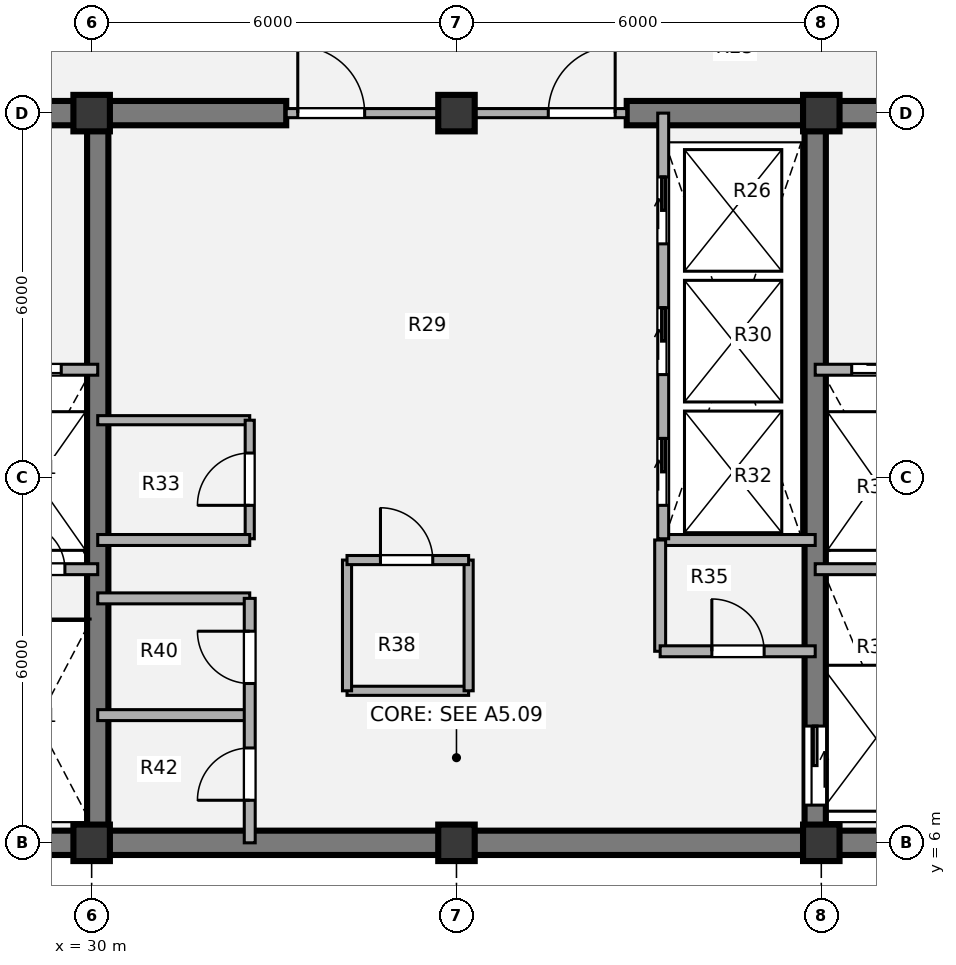
"""IFC4 building model, lengths in metres.
Left out: names, types, materials, properties, quantities, classifications, styles, units other than length and angle.
Written with IfcOpenShell. Run it as: python <this file> out.ifc"""

import sys

from ifc_helpers import new_model, si_unit, direction, frame, frame_2d, origin, origin_2d, place, context, subcontext, project, spatial, rectangle, extrude, source, transform, mapped, element, fill, save


model = new_model("IFC4")
c1 = context("Model", 3, precision=1e-05, world=origin(), true_north=direction((0.0, 1.0)))
c2 = subcontext(c1, "Body", "Model", "MODEL_VIEW")
j1 = project(units=[si_unit("LENGTHUNIT", "METRE"), si_unit("PLANEANGLEUNIT", "RADIAN")], contexts=[c1])
p1 = place(None, origin())
s1 = spatial("IfcSite", under=j1, at=p1, CompositionType="ELEMENT")
p2 = place(p1, origin())
s2 = spatial("IfcBuilding", under=s1, at=p2, CompositionType="ELEMENT")
p3 = place(p2, frame((0.0, 0.0, 223.02)))
s3 = spatial("IfcBuildingStorey", under=s2, at=p3, CompositionType="ELEMENT", Elevation=223.02)
m1 = source(origin(), c2, "Body", "SweptSolid", [
    extrude(rectangle(XDim=0.6, YDim=0.6, at=origin_2d()), origin(), (0.0, 0.0, 1.0), 3.78),
])
for number, where, z_axis, x_axis in (
    (1, (30.0, 6.0, 0.0), (0.0, 0.0, 1.0), (1.0, 0.0, 0.0)),
    (2, (36.0, 6.0, 0.0), (0.0, 0.0, 1.0), (1.0, 0.0, 0.0)),
    (3, (42.0, 6.0, 0.0), (0.0, 0.0, 1.0), (1.0, 0.0, 0.0)),
    (4, (30.0, 18.0, 0.0), (0.0, 0.0, 1.0), (1.0, 0.0, 0.0)),
    (5, (36.0, 18.0, 0.0), (0.0, 0.0, 1.0), (1.0, 0.0, 0.0)),
    (6, (42.0, 18.0, 0.0), (0.0, 0.0, 1.0), (1.0, 0.0, 0.0)),
):
    element("IfcColumn", number, at=place(p3, frame(where, z_axis=z_axis, x_axis=x_axis)), inside=s3, PredefinedType="COLUMN", context=c2, shape_type="MappedRepresentation", body=[
        mapped(m1, transform((0.0, 0.0, 0.0), x_axis=(1.0, 0.0, 0.0), y_axis=(0.0, 1.0, 0.0), z_axis=(0.0, 0.0, 1.0), scale=1.0)),
    ])
p4 = place(p3, frame((48.2, 6.0, 0.0), z_axis=(0.0, 0.0, 1.0), x_axis=(-1.0, 0.0, 0.0)))
e7 = element("IfcWall", 7, at=p4, inside=s3, PredefinedType="SHEAR", context=c2, shape_type="SweptSolid", body=[
    extrude(rectangle(XDim=24.4, YDim=0.4, at=frame_2d((12.2, 0.0))), origin(), (0.0, 0.0, 1.0), 3.78),
])
p5 = place(p3, frame((23.8, 18.0, 0.0), z_axis=(0.0, 0.0, 1.0), x_axis=(1.0, 0.0, 0.0)))
e8 = element("IfcWall", 8, at=p5, inside=s3, PredefinedType="SHEAR", context=c2, shape_type="SweptSolid", body=[
    extrude(rectangle(XDim=9.4, YDim=0.4, at=frame_2d((4.7, 0.0))), origin(), (0.0, 0.0, 1.0), 3.78),
])
p6 = place(p5, frame((2.95, 0.0, 0.0)))
e9 = element("IfcOpeningElement", 9, at=p6, cuts=e8, PredefinedType="OPENING", context=c2, shape_type="SweptSolid", body=[
    extrude(rectangle(XDim=1.1, YDim=2.1, at=origin_2d()), frame((0.55, 0.21, 1.05), z_axis=(0.0, -1.0, 0.0), x_axis=(1.0, 0.0, 0.0)), (0.0, 0.0, 1.0), 0.42),
])
p7 = place(p3, frame((38.8, 18.0, 0.0), z_axis=(0.0, 0.0, 1.0), x_axis=(1.0, 0.0, 0.0)))
e10 = element("IfcWall", 10, at=p7, inside=s3, PredefinedType="SHEAR", context=c2, shape_type="SweptSolid", body=[
    extrude(rectangle(XDim=9.4, YDim=0.4, at=frame_2d((4.7, 0.0))), origin(), (0.0, 0.0, 1.0), 3.78),
])
p8 = place(p7, frame((5.45, 0.0, 0.0)))
e11 = element("IfcOpeningElement", 11, at=p8, cuts=e10, PredefinedType="OPENING", context=c2, shape_type="SweptSolid", body=[
    extrude(rectangle(XDim=1.1, YDim=2.1, at=origin_2d()), frame((0.55, 0.21, 1.05), z_axis=(0.0, -1.0, 0.0), x_axis=(1.0, 0.0, 0.0)), (0.0, 0.0, 1.0), 0.42),
])
p9 = place(p3, frame((30.1, 6.0, 0.0), z_axis=(0.0, 0.0, 1.0), x_axis=(0.0, 1.0, 0.0)))
e12 = element("IfcWall", 12, at=p9, inside=s3, PredefinedType="SHEAR", context=c2, shape_type="SweptSolid", body=[
    extrude(rectangle(XDim=12.0, YDim=0.35, at=frame_2d((6.0, 0.0))), origin(), (0.0, 0.0, 1.0), 3.78),
])
p10 = place(p3, frame((41.9, 18.0, 0.0), z_axis=(0.0, 0.0, 1.0), x_axis=(0.0, -1.0, 0.0)))
e13 = element("IfcWall", 13, at=p10, inside=s3, PredefinedType="SHEAR", context=c2, shape_type="SweptSolid", body=[
    extrude(rectangle(XDim=12.0, YDim=0.35, at=frame_2d((6.0, 0.0))), origin(), (0.0, 0.0, 1.0), 3.78),
])
p11 = place(p10, frame((10.08, 0.0, 0.0)))
e14 = element("IfcOpeningElement", 14, at=p11, cuts=e13, PredefinedType="OPENING", context=c2, shape_type="SweptSolid", body=[
    extrude(rectangle(XDim=1.3, YDim=2.1, at=origin_2d()), frame((0.65, 0.185, 1.05), z_axis=(0.0, -1.0, 0.0), x_axis=(1.0, 0.0, 0.0)), (0.0, 0.0, 1.0), 0.37),
])
p12 = place(p3, frame((30.1, 12.95, 0.0), z_axis=(0.0, 0.0, 1.0), x_axis=(1.0, 0.0, 0.0)))
e15 = element("IfcWall", 15, at=p12, inside=s3, PredefinedType="PARTITIONING", context=c2, shape_type="SweptSolid", body=[
    extrude(rectangle(XDim=2.5, YDim=0.15, at=frame_2d((1.25, 0.0))), origin(), (0.0, 0.0, 1.0), 3.5),
])
p13 = place(p3, frame((32.6, 11.0, 0.0), z_axis=(0.0, 0.0, 1.0), x_axis=(0.0, 1.0, 0.0)))
e16 = element("IfcWall", 16, at=p13, inside=s3, PredefinedType="PARTITIONING", context=c2, shape_type="SweptSolid", body=[
    extrude(rectangle(XDim=1.95, YDim=0.15, at=frame_2d((0.975, 0.0))), origin(), (0.0, 0.0, 1.0), 3.5),
])
p14 = place(p13, frame((0.55, 0.0, 0.0)))
e17 = element("IfcOpeningElement", 17, at=p14, cuts=e16, PredefinedType="OPENING", context=c2, shape_type="SweptSolid", body=[
    extrude(rectangle(XDim=0.86, YDim=2.1, at=origin_2d()), frame((0.43, 0.085, 1.05), z_axis=(0.0, -1.0, 0.0), x_axis=(1.0, 0.0, 0.0)), (0.0, 0.0, 1.0), 0.17),
])
p15 = place(p3, frame((34.2, 8.5, 0.0), z_axis=(0.0, 0.0, 1.0), x_axis=(1.0, 0.0, 0.0)))
e18 = element("IfcWall", 18, at=p15, inside=s3, PredefinedType="PARTITIONING", context=c2, shape_type="SweptSolid", body=[
    extrude(rectangle(XDim=2.0, YDim=0.15, at=frame_2d((1.0, 0.0))), origin(), (0.0, 0.0, 1.0), 3.5),
])
p16 = place(p3, frame((34.2, 8.5, 0.0), z_axis=(0.0, 0.0, 1.0), x_axis=(0.0, 1.0, 0.0)))
e19 = element("IfcWall", 19, at=p16, inside=s3, PredefinedType="PARTITIONING", context=c2, shape_type="SweptSolid", body=[
    extrude(rectangle(XDim=2.15, YDim=0.15, at=frame_2d((1.075, 0.0))), origin(), (0.0, 0.0, 1.0), 3.5),
])
p17 = place(p3, frame((36.2, 8.5, 0.0), z_axis=(0.0, 0.0, 1.0), x_axis=(0.0, 1.0, 0.0)))
e20 = element("IfcWall", 20, at=p17, inside=s3, PredefinedType="PARTITIONING", context=c2, shape_type="SweptSolid", body=[
    extrude(rectangle(XDim=2.15, YDim=0.15, at=frame_2d((1.075, 0.0))), origin(), (0.0, 0.0, 1.0), 2.715),
])
p18 = place(p3, frame((34.2, 10.65, 0.0), z_axis=(0.0, 0.0, 1.0), x_axis=(1.0, 0.0, 0.0)))
e21 = element("IfcWall", 21, at=p18, inside=s3, PredefinedType="PARTITIONING", context=c2, shape_type="SweptSolid", body=[
    extrude(rectangle(XDim=2.0, YDim=0.15, at=frame_2d((1.0, 0.0))), origin(), (0.0, 0.0, 1.0), 3.5),
])
p19 = place(p18, frame((0.55, 0.0, 0.0)))
e22 = element("IfcOpeningElement", 22, at=p19, cuts=e21, PredefinedType="OPENING", context=c2, shape_type="SweptSolid", body=[
    extrude(rectangle(XDim=0.86, YDim=2.1, at=origin_2d()), frame((0.43, 0.085, 1.05), z_axis=(0.0, -1.0, 0.0), x_axis=(1.0, 0.0, 0.0)), (0.0, 0.0, 1.0), 0.17),
])
p20 = place(p3, frame((30.1, 10.98, 0.0), z_axis=(0.0, 0.0, 1.0), x_axis=(1.0, 0.0, 0.0)))
e23 = element("IfcWall", 23, at=p20, inside=s3, PredefinedType="PARTITIONING", context=c2, shape_type="SweptSolid", body=[
    extrude(rectangle(XDim=2.5, YDim=0.18, at=frame_2d((1.25, 0.0))), origin(), (0.0, 0.0, 1.0), 3.5),
])
p21 = place(p3, frame((39.35, 10.98, 0.0), z_axis=(0.0, 0.0, 1.0), x_axis=(1.0, 0.0, 0.0)))
e24 = element("IfcWall", 24, at=p21, inside=s3, PredefinedType="PARTITIONING", context=c2, shape_type="SweptSolid", body=[
    extrude(rectangle(XDim=2.55, YDim=0.18, at=frame_2d((1.275, 0.0))), origin(), (0.0, 0.0, 1.0), 3.5),
])
for number, where, z_axis, x_axis in (
    (25, (30.1, 8.1, 0.0), (0.0, 0.0, 1.0), (1.0, 0.0, 0.0)),
    (26, (30.1, 10.02, 0.0), (0.0, 0.0, 1.0), (1.0, 0.0, 0.0)),
):
    element("IfcWall", number, at=place(p3, frame(where, z_axis=z_axis, x_axis=x_axis)), inside=s3, PredefinedType="PARTITIONING", context=c2, shape_type="SweptSolid", body=[
        extrude(rectangle(XDim=2.5, YDim=0.18, at=frame_2d((1.25, 0.0))), origin(), (0.0, 0.0, 1.0), 3.5),
    ])
p22 = place(p3, frame((32.6, 6.0, 0.0), z_axis=(0.0, 0.0, 1.0), x_axis=(0.0, 1.0, 0.0)))
e27 = element("IfcWall", 27, at=p22, inside=s3, PredefinedType="PARTITIONING", context=c2, shape_type="SweptSolid", body=[
    extrude(rectangle(XDim=4.02, YDim=0.18, at=frame_2d((2.01, 0.0))), origin(), (0.0, 0.0, 1.0), 3.5),
])
p23 = place(p22, frame((0.7, 0.0, 0.0)))
e28 = element("IfcOpeningElement", 28, at=p23, cuts=e27, PredefinedType="OPENING", context=c2, shape_type="SweptSolid", body=[
    extrude(rectangle(XDim=0.86, YDim=2.1, at=origin_2d()), frame((0.43, 0.1, 1.05), z_axis=(0.0, -1.0, 0.0), x_axis=(1.0, 0.0, 0.0)), (0.0, 0.0, 1.0), 0.2),
])
p24 = place(p22, frame((2.62, 0.0, 0.0)))
e29 = element("IfcOpeningElement", 29, at=p24, cuts=e27, PredefinedType="OPENING", context=c2, shape_type="SweptSolid", body=[
    extrude(rectangle(XDim=0.86, YDim=2.1, at=origin_2d()), frame((0.43, 0.1, 1.05), z_axis=(0.0, -1.0, 0.0), x_axis=(1.0, 0.0, 0.0)), (0.0, 0.0, 1.0), 0.2),
])
p25 = place(p3, frame((39.35, 9.15, 0.0), z_axis=(0.0, 0.0, 1.0), x_axis=(0.0, 1.0, 0.0)))
e30 = element("IfcWall", 30, at=p25, inside=s3, PredefinedType="PARTITIONING", context=c2, shape_type="SweptSolid", body=[
    extrude(rectangle(XDim=1.83, YDim=0.18, at=frame_2d((0.915, 0.0))), origin(), (0.0, 0.0, 1.0), 3.5),
])
p26 = place(p3, frame((39.35, 9.15, 0.0), z_axis=(0.0, 0.0, 1.0), x_axis=(1.0, 0.0, 0.0)))
e31 = element("IfcWall", 31, at=p26, inside=s3, PredefinedType="PARTITIONING", context=c2, shape_type="SweptSolid", body=[
    extrude(rectangle(XDim=2.55, YDim=0.18, at=frame_2d((1.275, 0.0))), origin(), (0.0, 0.0, 1.0), 3.5),
])
p27 = place(p26, frame((0.85, 0.0, 0.0)))
e32 = element("IfcOpeningElement", 32, at=p27, cuts=e31, PredefinedType="OPENING", context=c2, shape_type="SweptSolid", body=[
    extrude(rectangle(XDim=0.86, YDim=2.1, at=origin_2d()), frame((0.43, 0.1, 1.05), z_axis=(0.0, -1.0, 0.0), x_axis=(1.0, 0.0, 0.0)), (0.0, 0.0, 1.0), 0.2),
])
p28 = place(p3, frame((33.2, 18.0, 0.0), z_axis=(0.0, 0.0, 1.0), x_axis=(1.0, 0.0, 0.0)))
e33 = element("IfcWall", 33, at=p28, inside=s3, PredefinedType="PARTITIONING", context=c2, shape_type="SweptSolid", body=[
    extrude(rectangle(XDim=5.6, YDim=0.15, at=frame_2d((2.8, 0.0))), origin(), (0.0, 0.0, 1.0), 2.515),
])
p29 = place(p28, frame((0.19, 0.0, 0.0)))
e34 = element("IfcOpeningElement", 34, at=p29, cuts=e33, PredefinedType="OPENING", context=c2, shape_type="SweptSolid", body=[
    extrude(rectangle(XDim=1.1, YDim=2.1, at=origin_2d()), frame((0.55, 0.085, 1.05), z_axis=(0.0, -1.0, 0.0), x_axis=(1.0, 0.0, 0.0)), (0.0, 0.0, 1.0), 0.17),
])
p30 = place(p28, frame((4.31, 0.0, 0.0)))
e35 = element("IfcOpeningElement", 35, at=p30, cuts=e33, PredefinedType="OPENING", context=c2, shape_type="SweptSolid", body=[
    extrude(rectangle(XDim=1.1, YDim=2.1, at=origin_2d()), frame((0.55, 0.085, 1.05), z_axis=(0.0, -1.0, 0.0), x_axis=(1.0, 0.0, 0.0)), (0.0, 0.0, 1.0), 0.17),
])
p31 = place(p3, frame((24.0, 13.78, 0.0), z_axis=(0.0, 0.0, 1.0), x_axis=(1.0, 0.0, 0.0)))
e36 = element("IfcWall", 36, at=p31, inside=s3, PredefinedType="PARTITIONING", context=c2, shape_type="SweptSolid", body=[
    extrude(rectangle(XDim=6.1, YDim=0.18, at=frame_2d((3.05, 0.0))), origin(), (0.0, 0.0, 1.0), 3.5),
])
p32 = place(p31, frame((1.15, 0.0, 0.0)))
e37 = element("IfcOpeningElement", 37, at=p32, cuts=e36, PredefinedType="OPENING", context=c2, shape_type="SweptSolid", body=[
    extrude(rectangle(XDim=1.1, YDim=2.1, at=origin_2d()), frame((0.55, 0.1, 1.05), z_axis=(0.0, -1.0, 0.0), x_axis=(1.0, 0.0, 0.0)), (0.0, 0.0, 1.0), 0.2),
])
p33 = place(p31, frame((4.4, 0.0, 0.0)))
e38 = element("IfcOpeningElement", 38, at=p33, cuts=e36, PredefinedType="OPENING", context=c2, shape_type="SweptSolid", body=[
    extrude(rectangle(XDim=1.1, YDim=2.1, at=origin_2d()), frame((0.55, 0.1, 1.05), z_axis=(0.0, -1.0, 0.0), x_axis=(1.0, 0.0, 0.0)), (0.0, 0.0, 1.0), 0.2),
])
p34 = place(p3, frame((28.15, 10.5, 0.0), z_axis=(0.0, 0.0, 1.0), x_axis=(1.0, 0.0, 0.0)))
e39 = element("IfcWall", 39, at=p34, inside=s3, PredefinedType="PARTITIONING", context=c2, shape_type="SweptSolid", body=[
    extrude(rectangle(XDim=1.95, YDim=0.18, at=frame_2d((0.975, 0.0))), origin(), (0.0, 0.0, 1.0), 3.5),
])
p35 = place(p34, frame((0.65, 0.0, 0.0)))
e40 = element("IfcOpeningElement", 40, at=p35, cuts=e39, PredefinedType="OPENING", context=c2, shape_type="SweptSolid", body=[
    extrude(rectangle(XDim=0.76, YDim=2.05, at=origin_2d()), frame((0.38, 0.1, 1.025), z_axis=(0.0, -1.0, 0.0), x_axis=(1.0, 0.0, 0.0)), (0.0, 0.0, 1.0), 0.2),
])
p36 = place(p3, frame((41.9, 13.78, 0.0), z_axis=(0.0, 0.0, 1.0), x_axis=(1.0, 0.0, 0.0)))
e41 = element("IfcWall", 41, at=p36, inside=s3, PredefinedType="PARTITIONING", context=c2, shape_type="SweptSolid", body=[
    extrude(rectangle(XDim=6.1, YDim=0.18, at=frame_2d((3.05, 0.0))), origin(), (0.0, 0.0, 1.0), 3.5),
])
p37 = place(p36, frame((0.6, 0.0, 0.0)))
e42 = element("IfcOpeningElement", 42, at=p37, cuts=e41, PredefinedType="OPENING", context=c2, shape_type="SweptSolid", body=[
    extrude(rectangle(XDim=1.1, YDim=2.1, at=origin_2d()), frame((0.55, 0.1, 1.05), z_axis=(0.0, -1.0, 0.0), x_axis=(1.0, 0.0, 0.0)), (0.0, 0.0, 1.0), 0.2),
])
p38 = place(p36, frame((3.8, 0.0, 0.0)))
e43 = element("IfcOpeningElement", 43, at=p38, cuts=e41, PredefinedType="OPENING", context=c2, shape_type="SweptSolid", body=[
    extrude(rectangle(XDim=1.1, YDim=2.1, at=origin_2d()), frame((0.55, 0.1, 1.05), z_axis=(0.0, -1.0, 0.0), x_axis=(1.0, 0.0, 0.0)), (0.0, 0.0, 1.0), 0.2),
])
p39 = place(p3, frame((41.9, 10.5, 0.0), z_axis=(0.0, 0.0, 1.0), x_axis=(1.0, 0.0, 0.0)))
e44 = element("IfcWall", 44, at=p39, inside=s3, PredefinedType="PARTITIONING", context=c2, shape_type="SweptSolid", body=[
    extrude(rectangle(XDim=1.95, YDim=0.18, at=frame_2d((0.975, 0.0))), origin(), (0.0, 0.0, 1.0), 3.5),
])
p40 = place(p3, frame((39.4, 11.0, 0.0), z_axis=(0.0, 0.0, 1.0), x_axis=(0.0, 1.0, 0.0)))
e45 = element("IfcWall", 45, at=p40, inside=s3, PredefinedType="PARTITIONING", context=c2, shape_type="SweptSolid", body=[
    extrude(rectangle(XDim=7.0, YDim=0.18, at=frame_2d((3.5, 0.0))), origin(), (0.0, 0.0, 1.0), 3.5),
])
p41 = place(p40, frame((0.55, 0.0, 0.0)))
e46 = element("IfcOpeningElement", 46, at=p41, cuts=e45, PredefinedType="OPENING", context=c2, shape_type="SweptSolid", body=[
    extrude(rectangle(XDim=1.1, YDim=2.1, at=origin_2d()), frame((0.55, 0.1, 1.05), z_axis=(0.0, -1.0, 0.0), x_axis=(1.0, 0.0, 0.0)), (0.0, 0.0, 1.0), 0.2),
])
p42 = place(p40, frame((2.7, 0.0, 0.0)))
e47 = element("IfcOpeningElement", 47, at=p42, cuts=e45, PredefinedType="OPENING", context=c2, shape_type="SweptSolid", body=[
    extrude(rectangle(XDim=1.1, YDim=2.1, at=origin_2d()), frame((0.55, 0.1, 1.05), z_axis=(0.0, -1.0, 0.0), x_axis=(1.0, 0.0, 0.0)), (0.0, 0.0, 1.0), 0.2),
])
p43 = place(p40, frame((4.85, 0.0, 0.0)))
e48 = element("IfcOpeningElement", 48, at=p43, cuts=e45, PredefinedType="OPENING", context=c2, shape_type="SweptSolid", body=[
    extrude(rectangle(XDim=1.1, YDim=2.1, at=origin_2d()), frame((0.55, 0.1, 1.05), z_axis=(0.0, -1.0, 0.0), x_axis=(1.0, 0.0, 0.0)), (0.0, 0.0, 1.0), 0.2),
])
m2 = source(origin(), c2, "Body", "SweptSolid", [
    extrude(rectangle(XDim=0.86, YDim=2.1, at=origin_2d()), frame((0.43, 0.025, 1.05), z_axis=(0.0, -1.0, 0.0), x_axis=(1.0, 0.0, 0.0)), (0.0, 0.0, 1.0), 0.05),
])
p44 = place(p14, origin())
e49 = element("IfcDoor", 49, at=p44, inside=s3, OperationType="SINGLE_SWING_LEFT", PredefinedType="DOOR", context=c2, shape_type="MappedRepresentation", body=[
    mapped(m2, transform((0.0, 0.0, 0.0), x_axis=(1.0, 0.0, 0.0), y_axis=(0.0, 1.0, 0.0), z_axis=(0.0, 0.0, 1.0), scale=1.0)),
])
fill(e17, e49)
p45 = place(p19, origin())
e50 = element("IfcDoor", 50, at=p45, inside=s3, OperationType="SINGLE_SWING_LEFT", PredefinedType="DOOR", context=c2, shape_type="MappedRepresentation", body=[
    mapped(m2, transform((0.0, 0.0, 0.0), x_axis=(1.0, 0.0, 0.0), y_axis=(0.0, 1.0, 0.0), z_axis=(0.0, 0.0, 1.0), scale=1.0)),
])
fill(e22, e50)
p46 = place(p23, origin())
e51 = element("IfcDoor", 51, at=p46, inside=s3, OperationType="SINGLE_SWING_LEFT", PredefinedType="DOOR", context=c2, shape_type="MappedRepresentation", body=[
    mapped(m2, transform((0.0, 0.0, 0.0), x_axis=(1.0, 0.0, 0.0), y_axis=(0.0, 1.0, 0.0), z_axis=(0.0, 0.0, 1.0), scale=1.0)),
])
fill(e28, e51)
p47 = place(p24, origin())
e52 = element("IfcDoor", 52, at=p47, inside=s3, OperationType="SINGLE_SWING_RIGHT", PredefinedType="DOOR", context=c2, shape_type="MappedRepresentation", body=[
    mapped(m2, transform((0.0, 0.0, 0.0), x_axis=(1.0, 0.0, 0.0), y_axis=(0.0, 1.0, 0.0), z_axis=(0.0, 0.0, 1.0), scale=1.0)),
])
fill(e29, e52)
p48 = place(p27, origin())
e53 = element("IfcDoor", 53, at=p48, inside=s3, OperationType="SINGLE_SWING_LEFT", PredefinedType="DOOR", context=c2, shape_type="MappedRepresentation", body=[
    mapped(m2, transform((0.0, 0.0, 0.0), x_axis=(1.0, 0.0, 0.0), y_axis=(0.0, 1.0, 0.0), z_axis=(0.0, 0.0, 1.0), scale=1.0)),
])
fill(e32, e53)
m3 = source(origin(), c2, "Body", "SweptSolid", [
    extrude(rectangle(XDim=1.1, YDim=2.1, at=origin_2d()), frame((0.55, 0.025, 1.05), z_axis=(0.0, -1.0, 0.0), x_axis=(1.0, 0.0, 0.0)), (0.0, 0.0, 1.0), 0.05),
])
p49 = place(p29, origin())
e54 = element("IfcDoor", 54, at=p49, inside=s3, OperationType="SINGLE_SWING_LEFT", PredefinedType="DOOR", context=c2, shape_type="MappedRepresentation", body=[
    mapped(m3, transform((0.0, 0.0, 0.0), x_axis=(1.0, 0.0, 0.0), y_axis=(0.0, 1.0, 0.0), z_axis=(0.0, 0.0, 1.0), scale=1.0)),
])
fill(e34, e54)
p50 = place(p30, origin())
e55 = element("IfcDoor", 55, at=p50, inside=s3, OperationType="SINGLE_SWING_RIGHT", PredefinedType="DOOR", context=c2, shape_type="MappedRepresentation", body=[
    mapped(m3, transform((0.0, 0.0, 0.0), x_axis=(1.0, 0.0, 0.0), y_axis=(0.0, 1.0, 0.0), z_axis=(0.0, 0.0, 1.0), scale=1.0)),
])
fill(e35, e55)
m4 = source(origin(), c2, "Body", "SweptSolid", [
    extrude(rectangle(XDim=1.1, YDim=2.1, at=origin_2d()), frame((0.55, 0.025, 1.05), z_axis=(0.0, -1.0, 0.0), x_axis=(1.0, 0.0, 0.0)), (0.0, 0.0, 1.0), 0.05),
])
p51 = place(p33, origin())
e56 = element("IfcDoor", 56, at=p51, inside=s3, OperationType="SLIDING_TO_LEFT", PredefinedType="DOOR", context=c2, shape_type="MappedRepresentation", body=[
    mapped(m4, transform((0.0, 0.0, 0.0), x_axis=(1.0, 0.0, 0.0), y_axis=(0.0, 1.0, 0.0), z_axis=(0.0, 0.0, 1.0), scale=1.0)),
])
fill(e38, e56)
m5 = source(origin(), c2, "Body", "SweptSolid", [
    extrude(rectangle(XDim=0.76, YDim=2.05, at=origin_2d()), frame((0.38, 0.025, 1.025), z_axis=(0.0, -1.0, 0.0), x_axis=(1.0, 0.0, 0.0)), (0.0, 0.0, 1.0), 0.05),
])
p52 = place(p35, origin())
e57 = element("IfcDoor", 57, at=p52, inside=s3, OperationType="SINGLE_SWING_LEFT", PredefinedType="DOOR", context=c2, shape_type="MappedRepresentation", body=[
    mapped(m5, transform((0.0, 0.0, 0.0), x_axis=(1.0, 0.0, 0.0), y_axis=(0.0, 1.0, 0.0), z_axis=(0.0, 0.0, 1.0), scale=1.0)),
])
fill(e40, e57)
p53 = place(p37, origin())
e58 = element("IfcDoor", 58, at=p53, inside=s3, OperationType="SLIDING_TO_RIGHT", PredefinedType="DOOR", context=c2, shape_type="MappedRepresentation", body=[
    mapped(m4, transform((0.0, 0.0, 0.0), x_axis=(1.0, 0.0, 0.0), y_axis=(0.0, 1.0, 0.0), z_axis=(0.0, 0.0, 1.0), scale=1.0)),
])
fill(e42, e58)
m6 = source(origin(), c2, "Body", "SweptSolid", [
    extrude(rectangle(XDim=1.3, YDim=2.1, at=origin_2d()), frame((0.65, 0.025, 1.05), z_axis=(0.0, -1.0, 0.0), x_axis=(1.0, 0.0, 0.0)), (0.0, 0.0, 1.0), 0.05),
])
p54 = place(p11, origin())
e59 = element("IfcDoor", 59, at=p54, inside=s3, OperationType="SLIDING_TO_LEFT", PredefinedType="DOOR", context=c2, shape_type="MappedRepresentation", body=[
    mapped(m6, transform((0.0, 0.0, 0.0), x_axis=(1.0, 0.0, 0.0), y_axis=(0.0, 1.0, 0.0), z_axis=(0.0, 0.0, 1.0), scale=1.0)),
])
fill(e14, e59)
p55 = place(p41, origin())
e60 = element("IfcDoor", 60, at=p55, inside=s3, OperationType="SLIDING_TO_RIGHT", PredefinedType="DOOR", context=c2, shape_type="MappedRepresentation", body=[
    mapped(m4, transform((0.0, 0.0, 0.0), x_axis=(1.0, 0.0, 0.0), y_axis=(0.0, 1.0, 0.0), z_axis=(0.0, 0.0, 1.0), scale=1.0)),
])
fill(e46, e60)
p56 = place(p42, origin())
e61 = element("IfcDoor", 61, at=p56, inside=s3, OperationType="SLIDING_TO_RIGHT", PredefinedType="DOOR", context=c2, shape_type="MappedRepresentation", body=[
    mapped(m4, transform((0.0, 0.0, 0.0), x_axis=(1.0, 0.0, 0.0), y_axis=(0.0, 1.0, 0.0), z_axis=(0.0, 0.0, 1.0), scale=1.0)),
])
fill(e47, e61)
p57 = place(p43, origin())
e62 = element("IfcDoor", 62, at=p57, inside=s3, OperationType="SLIDING_TO_RIGHT", PredefinedType="DOOR", context=c2, shape_type="MappedRepresentation", body=[
    mapped(m4, transform((0.0, 0.0, 0.0), x_axis=(1.0, 0.0, 0.0), y_axis=(0.0, 1.0, 0.0), z_axis=(0.0, 0.0, 1.0), scale=1.0)),
])
fill(e48, e62)
save(model, sys.argv[1])
